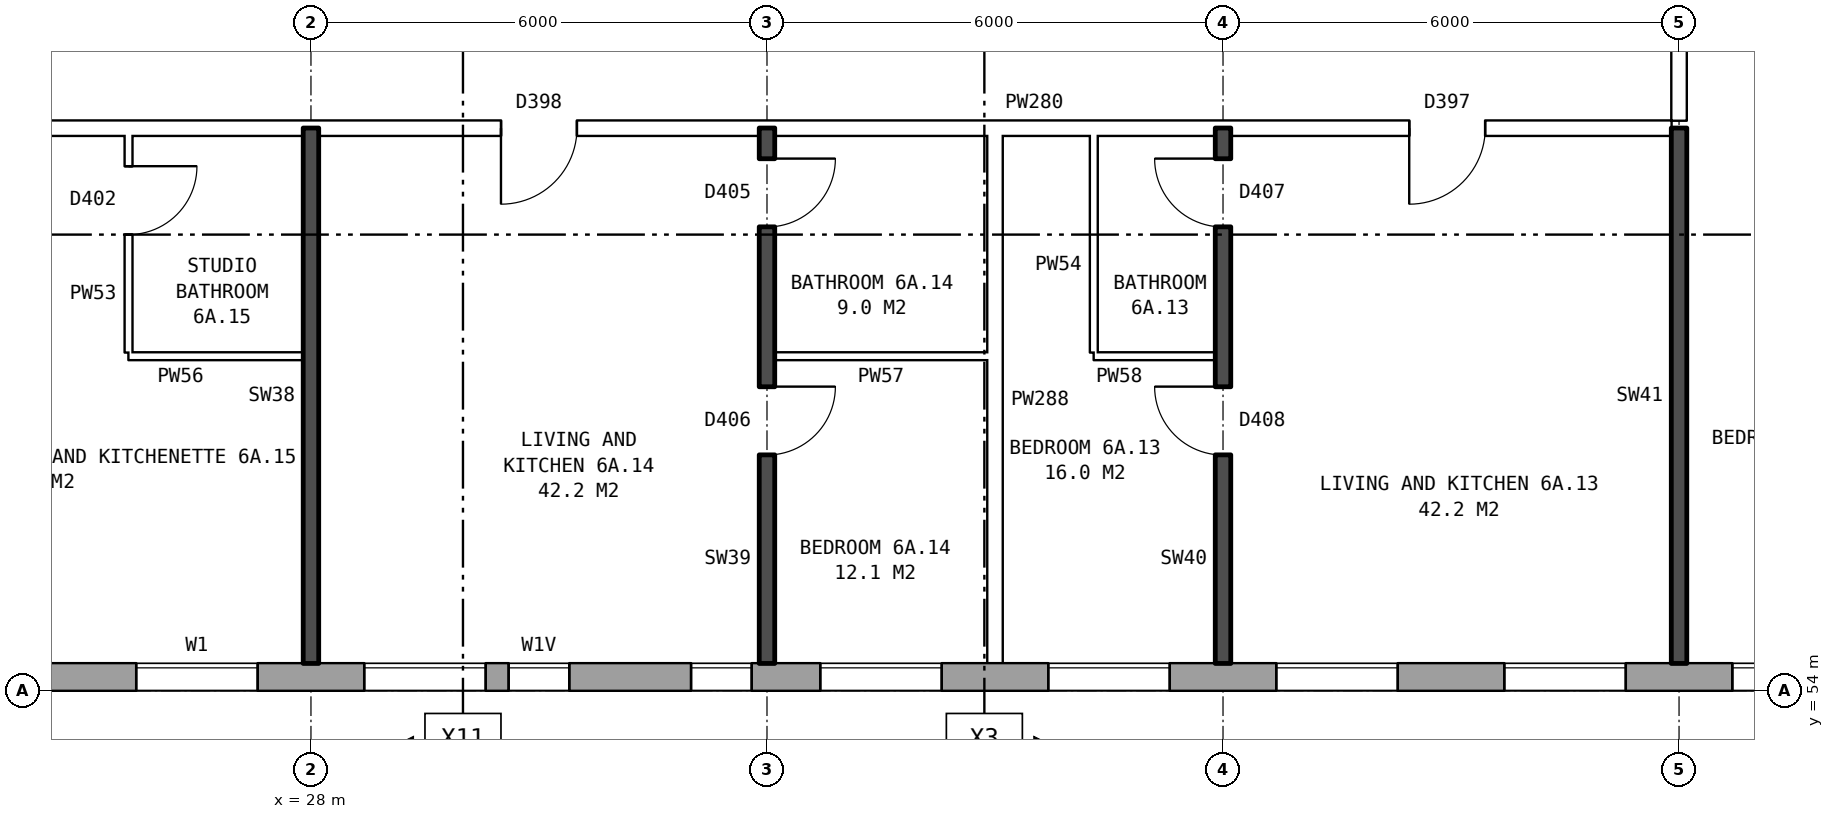
"""IFC4 building model, lengths in metres.
Left out: names, types, materials, properties, quantities, classifications, styles, units other than length and angle.
Written with IfcOpenShell. Run it as: python <this file> out.ifc"""

import sys

from ifc_helpers import new_model, si_unit, direction, frame, frame_2d, origin, place, context, subcontext, project, spatial, rectangle, extrude, element, fill, save


model = new_model("IFC4")
c1 = context("Model", 3, precision=1e-05, world=origin(), true_north=direction((0.0, 1.0)))
c2 = subcontext(c1, "Body", "Model", "MODEL_VIEW")
j1 = project(units=[si_unit("LENGTHUNIT", "METRE"), si_unit("PLANEANGLEUNIT", "RADIAN")], contexts=[c1])
p1 = place(None, origin())
s1 = spatial("IfcSite", under=j1, at=p1, CompositionType="ELEMENT")
p2 = place(p1, origin())
s2 = spatial("IfcBuilding", under=s1, at=p2, CompositionType="ELEMENT")
p3 = place(p2, frame((0.0, 0.0, 25.7)))
s3 = spatial("IfcBuildingStorey", under=s2, at=p3, CompositionType="ELEMENT", Elevation=25.7)
p4 = place(p3, frame((22.825, 54.18, 0.0), z_axis=(0.0, 0.0, 1.0), x_axis=(1.0, 0.0, 0.0)))
e1 = element("IfcWall", 1, at=p4, inside=s3, PredefinedType="STANDARD", context=c2, shape_type="SweptSolid", body=[
    extrude(rectangle(XDim=50.101, YDim=0.36, at=frame_2d((25.05, 0.0))), origin(), (0.0, 0.0, 1.0), 2.85),
])
p5 = place(p4, frame((2.875, 0.0, 0.8)))
e2 = element("IfcOpeningElement", 2, at=p5, cuts=e1, PredefinedType="OPENING", context=c2, shape_type="SweptSolid", body=[
    extrude(rectangle(XDim=1.6, YDim=1.8, at=frame_2d((0.8, 0.9))), frame((0.0, 0.19, 0.0), z_axis=(0.0, -1.0, 0.0), x_axis=(1.0, 0.0, 0.0)), (0.0, 0.0, 1.0), 0.38),
])
p6 = place(p4, frame((5.875, 0.0, 0.8)))
e3 = element("IfcOpeningElement", 3, at=p6, cuts=e1, PredefinedType="OPENING", context=c2, shape_type="SweptSolid", body=[
    extrude(rectangle(XDim=1.6, YDim=1.8, at=frame_2d((0.8, 0.9))), frame((0.0, 0.19, 0.0), z_axis=(0.0, -1.0, 0.0), x_axis=(1.0, 0.0, 0.0)), (0.0, 0.0, 1.0), 0.38),
])
p7 = place(p4, frame((7.775, 0.0, 1.6)))
e4 = element("IfcOpeningElement", 4, at=p7, cuts=e1, PredefinedType="OPENING", context=c2, shape_type="SweptSolid", body=[
    extrude(rectangle(XDim=0.8, YDim=0.9, at=frame_2d((0.4, 0.45))), frame((0.0, 0.19, 0.0), z_axis=(0.0, -1.0, 0.0), x_axis=(1.0, 0.0, 0.0)), (0.0, 0.0, 1.0), 0.38),
])
p8 = place(p4, frame((11.875, 0.0, 0.8)))
e5 = element("IfcOpeningElement", 5, at=p8, cuts=e1, PredefinedType="OPENING", context=c2, shape_type="SweptSolid", body=[
    extrude(rectangle(XDim=1.6, YDim=1.8, at=frame_2d((0.8, 0.9))), frame((0.0, 0.19, 0.0), z_axis=(0.0, -1.0, 0.0), x_axis=(1.0, 0.0, 0.0)), (0.0, 0.0, 1.0), 0.38),
])
p9 = place(p4, frame((14.875, 0.0, 0.8)))
e6 = element("IfcOpeningElement", 6, at=p9, cuts=e1, PredefinedType="OPENING", context=c2, shape_type="SweptSolid", body=[
    extrude(rectangle(XDim=1.6, YDim=1.8, at=frame_2d((0.8, 0.9))), frame((0.0, 0.19, 0.0), z_axis=(0.0, -1.0, 0.0), x_axis=(1.0, 0.0, 0.0)), (0.0, 0.0, 1.0), 0.38),
])
p10 = place(p4, frame((17.875, 0.0, 0.8)))
e7 = element("IfcOpeningElement", 7, at=p10, cuts=e1, PredefinedType="OPENING", context=c2, shape_type="SweptSolid", body=[
    extrude(rectangle(XDim=1.6, YDim=1.8, at=frame_2d((0.8, 0.9))), frame((0.0, 0.19, 0.0), z_axis=(0.0, -1.0, 0.0), x_axis=(1.0, 0.0, 0.0)), (0.0, 0.0, 1.0), 0.38),
])
p11 = place(p4, frame((20.875, 0.0, 0.8)))
e8 = element("IfcOpeningElement", 8, at=p11, cuts=e1, PredefinedType="OPENING", context=c2, shape_type="SweptSolid", body=[
    extrude(rectangle(XDim=1.6, YDim=1.8, at=frame_2d((0.8, 0.9))), frame((0.0, 0.19, 0.0), z_axis=(0.0, -1.0, 0.0), x_axis=(1.0, 0.0, 0.0)), (0.0, 0.0, 1.0), 0.38),
])
p12 = place(p4, frame((23.875, 0.0, 0.8)))
e9 = element("IfcOpeningElement", 9, at=p12, cuts=e1, PredefinedType="OPENING", context=c2, shape_type="SweptSolid", body=[
    extrude(rectangle(XDim=1.6, YDim=1.8, at=frame_2d((0.8, 0.9))), frame((0.0, 0.19, 0.0), z_axis=(0.0, -1.0, 0.0), x_axis=(1.0, 0.0, 0.0)), (0.0, 0.0, 1.0), 0.38),
])
p13 = place(p4, frame((26.875, 0.0, 0.8)))
e10 = element("IfcOpeningElement", 10, at=p13, cuts=e1, PredefinedType="OPENING", context=c2, shape_type="SweptSolid", body=[
    extrude(rectangle(XDim=1.6, YDim=1.8, at=frame_2d((0.8, 0.9))), frame((0.0, 0.19, 0.0), z_axis=(0.0, -1.0, 0.0), x_axis=(1.0, 0.0, 0.0)), (0.0, 0.0, 1.0), 0.38),
])
p14 = place(p4, frame((29.875, 0.0, 0.8)))
e11 = element("IfcOpeningElement", 11, at=p14, cuts=e1, PredefinedType="OPENING", context=c2, shape_type="SweptSolid", body=[
    extrude(rectangle(XDim=1.6, YDim=1.8, at=frame_2d((0.8, 0.9))), frame((0.0, 0.19, 0.0), z_axis=(0.0, -1.0, 0.0), x_axis=(1.0, 0.0, 0.0)), (0.0, 0.0, 1.0), 0.38),
])
p15 = place(p4, frame((32.875, 0.0, 0.8)))
e12 = element("IfcOpeningElement", 12, at=p15, cuts=e1, PredefinedType="OPENING", context=c2, shape_type="SweptSolid", body=[
    extrude(rectangle(XDim=1.6, YDim=1.8, at=frame_2d((0.8, 0.9))), frame((0.0, 0.19, 0.0), z_axis=(0.0, -1.0, 0.0), x_axis=(1.0, 0.0, 0.0)), (0.0, 0.0, 1.0), 0.38),
])
p16 = place(p4, frame((35.875, 0.0, 0.8)))
e13 = element("IfcOpeningElement", 13, at=p16, cuts=e1, PredefinedType="OPENING", context=c2, shape_type="SweptSolid", body=[
    extrude(rectangle(XDim=1.6, YDim=1.8, at=frame_2d((0.8, 0.9))), frame((0.0, 0.19, 0.0), z_axis=(0.0, -1.0, 0.0), x_axis=(1.0, 0.0, 0.0)), (0.0, 0.0, 1.0), 0.38),
])
p17 = place(p4, frame((38.325, 0.0, 0.15)))
e14 = element("IfcOpeningElement", 14, at=p17, cuts=e1, PredefinedType="OPENING", context=c2, shape_type="SweptSolid", body=[
    extrude(rectangle(XDim=1.2, YDim=1.8, at=frame_2d((0.6, 0.9))), frame((0.0, 0.19, 0.0), z_axis=(0.0, -1.0, 0.0), x_axis=(1.0, 0.0, 0.0)), (0.0, 0.0, 1.0), 0.38),
])
p18 = place(p4, frame((41.825, 0.0, 1.4)))
e15 = element("IfcOpeningElement", 15, at=p18, cuts=e1, PredefinedType="OPENING", context=c2, shape_type="SweptSolid", body=[
    extrude(rectangle(XDim=1.0, YDim=1.2, at=frame_2d((0.5, 0.6))), frame((0.0, 0.19, 0.0), z_axis=(0.0, -1.0, 0.0), x_axis=(1.0, 0.0, 0.0)), (0.0, 0.0, 1.0), 0.38),
])
p19 = place(p4, frame((44.875, 0.0, 0.8)))
e16 = element("IfcOpeningElement", 16, at=p19, cuts=e1, PredefinedType="OPENING", context=c2, shape_type="SweptSolid", body=[
    extrude(rectangle(XDim=1.6, YDim=1.8, at=frame_2d((0.8, 0.9))), frame((0.0, 0.19, 0.0), z_axis=(0.0, -1.0, 0.0), x_axis=(1.0, 0.0, 0.0)), (0.0, 0.0, 1.0), 0.38),
])
p20 = place(p4, frame((47.875, 0.0, 0.8)))
e17 = element("IfcOpeningElement", 17, at=p20, cuts=e1, PredefinedType="OPENING", context=c2, shape_type="SweptSolid", body=[
    extrude(rectangle(XDim=1.6, YDim=1.8, at=frame_2d((0.8, 0.9))), frame((0.0, 0.19, 0.0), z_axis=(0.0, -1.0, 0.0), x_axis=(1.0, 0.0, 0.0)), (0.0, 0.0, 1.0), 0.38),
])
p21 = place(p4, frame((10.175, 0.0, 0.8)))
e18 = element("IfcOpeningElement", 18, at=p21, cuts=e1, PredefinedType="OPENING", context=c2, shape_type="SweptSolid", body=[
    extrude(rectangle(XDim=0.8, YDim=0.9, at=frame_2d((0.4, 0.45))), frame((0.0, 0.19, 0.0), z_axis=(0.0, -1.0, 0.0), x_axis=(1.0, 0.0, 0.0)), (0.0, 0.0, 1.0), 0.38),
])
p22 = place(p4, frame((39.825, 0.0, 0.15)))
e19 = element("IfcOpeningElement", 19, at=p22, cuts=e1, PredefinedType="OPENING", context=c2, shape_type="SweptSolid", body=[
    extrude(rectangle(XDim=1.0, YDim=0.9, at=frame_2d((0.5, 0.45))), frame((0.0, 0.19, 0.0), z_axis=(0.0, -1.0, 0.0), x_axis=(1.0, 0.0, 0.0)), (0.0, 0.0, 1.0), 0.38),
])
p23 = place(p4, frame((43.125, 0.0, 0.8)))
e20 = element("IfcOpeningElement", 20, at=p23, cuts=e1, PredefinedType="OPENING", context=c2, shape_type="SweptSolid", body=[
    extrude(rectangle(XDim=1.4, YDim=1.8, at=frame_2d((0.7, 0.9))), frame((0.0, 0.19, 0.0), z_axis=(0.0, -1.0, 0.0), x_axis=(1.0, 0.0, 0.0)), (0.0, 0.0, 1.0), 0.38),
])
p24 = place(p3, frame((25.6, 58.4, 0.0), z_axis=(0.0, 0.0, 1.0), x_axis=(1.0, 0.0, 0.0)))
e21 = element("IfcWall", 21, at=p24, inside=s3, PredefinedType="PARTITIONING", context=c2, shape_type="SweptSolid", body=[
    extrude(rectangle(XDim=2.3, YDim=0.1, at=frame_2d((1.15, 0.0))), origin(), (0.0, 0.0, 1.0), 2.85),
])
p25 = place(p3, frame((34.1, 58.4, 0.0), z_axis=(0.0, 0.0, 1.0), x_axis=(1.0, 0.0, 0.0)))
e22 = element("IfcWall", 22, at=p25, inside=s3, PredefinedType="PARTITIONING", context=c2, shape_type="SweptSolid", body=[
    extrude(rectangle(XDim=2.8, YDim=0.1, at=frame_2d((1.4, 0.0))), origin(), (0.0, 0.0, 1.0), 2.85),
])
p26 = place(p3, frame((38.3, 58.4, 0.0), z_axis=(0.0, 0.0, 1.0), x_axis=(1.0, 0.0, 0.0)))
e23 = element("IfcWall", 23, at=p26, inside=s3, PredefinedType="PARTITIONING", context=c2, shape_type="SweptSolid", body=[
    extrude(rectangle(XDim=1.6, YDim=0.1, at=frame_2d((0.8, 0.0))), origin(), (0.0, 0.0, 1.0), 2.85),
])
p27 = place(p3, frame((20.11, 61.4, 0.0), z_axis=(0.0, 0.0, 1.0), x_axis=(1.0, 0.0, 0.0)))
e24 = element("IfcWall", 24, at=p27, inside=s3, PredefinedType="PARTITIONING", context=c2, shape_type="SweptSolid", body=[
    extrude(rectangle(XDim=25.79, YDim=0.2, at=frame_2d((12.895, 0.0))), origin(), (0.0, 0.0, 1.0), 2.85),
])
p28 = place(p27, frame((22.34, 0.0, 0.0)))
e25 = element("IfcOpeningElement", 25, at=p28, cuts=e24, PredefinedType="OPENING", context=c2, shape_type="SweptSolid", body=[
    extrude(rectangle(XDim=1.0, YDim=2.1, at=frame_2d((0.5, 1.05))), frame((0.0, 0.11, 0.0), z_axis=(0.0, -1.0, 0.0), x_axis=(1.0, 0.0, 0.0)), (0.0, 0.0, 1.0), 0.22),
])
p29 = place(p27, frame((10.39, 0.0, 0.0)))
e26 = element("IfcOpeningElement", 26, at=p29, cuts=e24, PredefinedType="OPENING", context=c2, shape_type="SweptSolid", body=[
    extrude(rectangle(XDim=1.0, YDim=2.1, at=frame_2d((0.5, 1.05))), frame((0.0, 0.11, 0.0), z_axis=(0.0, -1.0, 0.0), x_axis=(1.0, 0.0, 0.0)), (0.0, 0.0, 1.0), 0.22),
])
p30 = place(p27, frame((2.245, 0.0, 0.0)))
e27 = element("IfcOpeningElement", 27, at=p30, cuts=e24, PredefinedType="OPENING", context=c2, shape_type="SweptSolid", body=[
    extrude(rectangle(XDim=1.0, YDim=2.1, at=frame_2d((0.5, 1.05))), frame((0.0, 0.11, 0.0), z_axis=(0.0, -1.0, 0.0), x_axis=(1.0, 0.0, 0.0)), (0.0, 0.0, 1.0), 0.22),
])
p31 = place(p3, frame((25.6, 58.45, 0.0), z_axis=(0.0, 0.0, 1.0), x_axis=(0.0, 1.0, 0.0)))
e28 = element("IfcWall", 28, at=p31, inside=s3, PredefinedType="PARTITIONING", context=c2, shape_type="SweptSolid", body=[
    extrude(rectangle(XDim=2.85, YDim=0.1, at=frame_2d((1.425, 0.0))), origin(), (0.0, 0.0, 1.0), 2.85),
])
p32 = place(p31, frame((1.55, 0.0, 0.0)))
e29 = element("IfcOpeningElement", 29, at=p32, cuts=e28, PredefinedType="OPENING", context=c2, shape_type="SweptSolid", body=[
    extrude(rectangle(XDim=0.9, YDim=2.1, at=frame_2d((0.45, 1.05))), frame((0.0, 0.06, 0.0), z_axis=(0.0, -1.0, 0.0), x_axis=(1.0, 0.0, 0.0)), (0.0, 0.0, 1.0), 0.12),
])
p33 = place(p3, frame((28.0, 54.36, 0.0), z_axis=(0.0, 0.0, 1.0), x_axis=(0.0, 1.0, 0.0)))
e30 = element("IfcWall", 30, at=p33, inside=s3, PredefinedType="SOLIDWALL", context=c2, shape_type="SweptSolid", body=[
    extrude(rectangle(XDim=7.04, YDim=0.2, at=frame_2d((3.52, 0.0))), origin(), (0.0, 0.0, 1.0), 2.85),
])
p34 = place(p3, frame((34.0, 54.36, 0.0), z_axis=(0.0, 0.0, 1.0), x_axis=(0.0, 1.0, 0.0)))
e31 = element("IfcWall", 31, at=p34, inside=s3, PredefinedType="SOLIDWALL", context=c2, shape_type="SweptSolid", body=[
    extrude(rectangle(XDim=7.04, YDim=0.2, at=frame_2d((3.52, 0.0))), origin(), (0.0, 0.0, 1.0), 2.85),
])
p35 = place(p34, frame((2.74, 0.0, 0.0)))
e32 = element("IfcOpeningElement", 32, at=p35, cuts=e31, PredefinedType="OPENING", context=c2, shape_type="SweptSolid", body=[
    extrude(rectangle(XDim=0.9, YDim=2.1, at=frame_2d((0.45, 1.05))), frame((0.0, 0.11, 0.0), z_axis=(0.0, -1.0, 0.0), x_axis=(1.0, 0.0, 0.0)), (0.0, 0.0, 1.0), 0.22),
])
p36 = place(p34, frame((5.74, 0.0, 0.0)))
e33 = element("IfcOpeningElement", 33, at=p36, cuts=e31, PredefinedType="OPENING", context=c2, shape_type="SweptSolid", body=[
    extrude(rectangle(XDim=0.9, YDim=2.1, at=frame_2d((0.45, 1.05))), frame((0.0, 0.11, 0.0), z_axis=(0.0, -1.0, 0.0), x_axis=(1.0, 0.0, 0.0)), (0.0, 0.0, 1.0), 0.22),
])
p37 = place(p3, frame((37.0, 54.36, 0.0), z_axis=(0.0, 0.0, 1.0), x_axis=(0.0, 1.0, 0.0)))
e34 = element("IfcWall", 34, at=p37, inside=s3, PredefinedType="PARTITIONING", context=c2, shape_type="SweptSolid", body=[
    extrude(rectangle(XDim=6.94, YDim=0.2, at=frame_2d((3.47, 0.0))), origin(), (0.0, 0.0, 1.0), 2.85),
])
p38 = place(p3, frame((38.3, 58.45, 0.0), z_axis=(0.0, 0.0, 1.0), x_axis=(0.0, 1.0, 0.0)))
e35 = element("IfcWall", 35, at=p38, inside=s3, PredefinedType="PARTITIONING", context=c2, shape_type="SweptSolid", body=[
    extrude(rectangle(XDim=2.85, YDim=0.1, at=frame_2d((1.425, 0.0))), origin(), (0.0, 0.0, 1.0), 2.85),
])
p39 = place(p3, frame((40.0, 54.36, 0.0), z_axis=(0.0, 0.0, 1.0), x_axis=(0.0, 1.0, 0.0)))
e36 = element("IfcWall", 36, at=p39, inside=s3, PredefinedType="SOLIDWALL", context=c2, shape_type="SweptSolid", body=[
    extrude(rectangle(XDim=7.04, YDim=0.2, at=frame_2d((3.52, 0.0))), origin(), (0.0, 0.0, 1.0), 2.85),
])
p40 = place(p39, frame((2.74, 0.0, 0.0)))
e37 = element("IfcOpeningElement", 37, at=p40, cuts=e36, PredefinedType="OPENING", context=c2, shape_type="SweptSolid", body=[
    extrude(rectangle(XDim=0.9, YDim=2.1, at=frame_2d((0.45, 1.05))), frame((0.0, 0.11, 0.0), z_axis=(0.0, -1.0, 0.0), x_axis=(1.0, 0.0, 0.0)), (0.0, 0.0, 1.0), 0.22),
])
p41 = place(p39, frame((5.74, 0.0, 0.0)))
e38 = element("IfcOpeningElement", 38, at=p41, cuts=e36, PredefinedType="OPENING", context=c2, shape_type="SweptSolid", body=[
    extrude(rectangle(XDim=0.9, YDim=2.1, at=frame_2d((0.45, 1.05))), frame((0.0, 0.11, 0.0), z_axis=(0.0, -1.0, 0.0), x_axis=(1.0, 0.0, 0.0)), (0.0, 0.0, 1.0), 0.22),
])
p42 = place(p3, frame((46.0, 54.36, 0.0), z_axis=(0.0, 0.0, 1.0), x_axis=(0.0, 1.0, 0.0)))
e39 = element("IfcWall", 39, at=p42, inside=s3, PredefinedType="SOLIDWALL", context=c2, shape_type="SweptSolid", body=[
    extrude(rectangle(XDim=7.04, YDim=0.2, at=frame_2d((3.52, 0.0))), origin(), (0.0, 0.0, 1.0), 2.85),
])
p43 = place(p3, frame((46.0, 61.5, 0.0), z_axis=(0.0, 0.0, 1.0), x_axis=(0.0, 1.0, 0.0)))
e40 = element("IfcWall", 40, at=p43, inside=s3, PredefinedType="PARTITIONING", context=c2, shape_type="SweptSolid", body=[
    extrude(rectangle(XDim=2.2, YDim=0.2, at=frame_2d((1.1, 0.0))), origin(), (0.0, 0.0, 1.0), 2.85),
])
p44 = place(p5, origin())
e41 = element("IfcWindow", 41, at=p44, inside=s3, PartitioningType="SINGLE_PANEL", PredefinedType="WINDOW", context=c2, shape_type="SweptSolid", body=[
    extrude(rectangle(XDim=1.6, YDim=1.8, at=frame_2d((0.8, 0.9))), frame((0.0, 0.15, 0.0), z_axis=(0.0, -1.0, 0.0), x_axis=(1.0, 0.0, 0.0)), (0.0, 0.0, 1.0), 0.06),
])
fill(e2, e41)
p45 = place(p6, origin())
e42 = element("IfcWindow", 42, at=p45, inside=s3, PartitioningType="SINGLE_PANEL", PredefinedType="WINDOW", context=c2, shape_type="SweptSolid", body=[
    extrude(rectangle(XDim=1.6, YDim=1.8, at=frame_2d((0.8, 0.9))), frame((0.0, 0.15, 0.0), z_axis=(0.0, -1.0, 0.0), x_axis=(1.0, 0.0, 0.0)), (0.0, 0.0, 1.0), 0.06),
])
fill(e3, e42)
p46 = place(p7, origin())
e43 = element("IfcWindow", 43, at=p46, inside=s3, PartitioningType="SINGLE_PANEL", PredefinedType="WINDOW", context=c2, shape_type="SweptSolid", body=[
    extrude(rectangle(XDim=0.8, YDim=0.9, at=frame_2d((0.4, 0.45))), frame((0.0, 0.15, 0.0), z_axis=(0.0, -1.0, 0.0), x_axis=(1.0, 0.0, 0.0)), (0.0, 0.0, 1.0), 0.06),
])
fill(e4, e43)
p47 = place(p8, origin())
e44 = element("IfcWindow", 44, at=p47, inside=s3, PartitioningType="SINGLE_PANEL", PredefinedType="WINDOW", context=c2, shape_type="SweptSolid", body=[
    extrude(rectangle(XDim=1.6, YDim=1.8, at=frame_2d((0.8, 0.9))), frame((0.0, 0.15, 0.0), z_axis=(0.0, -1.0, 0.0), x_axis=(1.0, 0.0, 0.0)), (0.0, 0.0, 1.0), 0.06),
])
fill(e5, e44)
p48 = place(p9, origin())
e45 = element("IfcWindow", 45, at=p48, inside=s3, PartitioningType="SINGLE_PANEL", PredefinedType="WINDOW", context=c2, shape_type="SweptSolid", body=[
    extrude(rectangle(XDim=1.6, YDim=1.8, at=frame_2d((0.8, 0.9))), frame((0.0, 0.15, 0.0), z_axis=(0.0, -1.0, 0.0), x_axis=(1.0, 0.0, 0.0)), (0.0, 0.0, 1.0), 0.06),
])
fill(e6, e45)
p49 = place(p10, origin())
e46 = element("IfcWindow", 46, at=p49, inside=s3, PartitioningType="SINGLE_PANEL", PredefinedType="WINDOW", context=c2, shape_type="SweptSolid", body=[
    extrude(rectangle(XDim=1.6, YDim=1.8, at=frame_2d((0.8, 0.9))), frame((0.0, 0.15, 0.0), z_axis=(0.0, -1.0, 0.0), x_axis=(1.0, 0.0, 0.0)), (0.0, 0.0, 1.0), 0.06),
])
fill(e7, e46)
p50 = place(p11, origin())
e47 = element("IfcWindow", 47, at=p50, inside=s3, PartitioningType="SINGLE_PANEL", PredefinedType="WINDOW", context=c2, shape_type="SweptSolid", body=[
    extrude(rectangle(XDim=1.6, YDim=1.8, at=frame_2d((0.8, 0.9))), frame((0.0, 0.15, 0.0), z_axis=(0.0, -1.0, 0.0), x_axis=(1.0, 0.0, 0.0)), (0.0, 0.0, 1.0), 0.06),
])
fill(e8, e47)
p51 = place(p12, origin())
e48 = element("IfcWindow", 48, at=p51, inside=s3, PartitioningType="SINGLE_PANEL", PredefinedType="WINDOW", context=c2, shape_type="SweptSolid", body=[
    extrude(rectangle(XDim=1.6, YDim=1.8, at=frame_2d((0.8, 0.9))), frame((0.0, 0.15, 0.0), z_axis=(0.0, -1.0, 0.0), x_axis=(1.0, 0.0, 0.0)), (0.0, 0.0, 1.0), 0.06),
])
fill(e9, e48)
p52 = place(p40, origin())
e49 = element("IfcDoor", 49, at=p52, inside=s3, OperationType="SINGLE_SWING_RIGHT", PredefinedType="DOOR", context=c2, shape_type="SweptSolid", body=[
    extrude(rectangle(XDim=0.9, YDim=2.1, at=frame_2d((0.45, 1.05))), frame((0.0, 0.025, 0.0), z_axis=(0.0, -1.0, 0.0), x_axis=(1.0, 0.0, 0.0)), (0.0, 0.0, 1.0), 0.05),
])
fill(e37, e49)
p53 = place(p28, frame((1.0, 0.0, 0.0), z_axis=(0.0, 0.0, 1.0), x_axis=(-1.0, 0.0, 0.0)))
e50 = element("IfcDoor", 50, at=p53, inside=s3, OperationType="SINGLE_SWING_RIGHT", PredefinedType="DOOR", context=c2, shape_type="SweptSolid", body=[
    extrude(rectangle(XDim=1.0, YDim=2.1, at=frame_2d((0.5, 1.05))), frame((0.0, 0.025, 0.0), z_axis=(0.0, -1.0, 0.0), x_axis=(1.0, 0.0, 0.0)), (0.0, 0.0, 1.0), 0.05),
])
fill(e25, e50)
p54 = place(p41, origin())
e51 = element("IfcDoor", 51, at=p54, inside=s3, OperationType="SINGLE_SWING_RIGHT", PredefinedType="DOOR", context=c2, shape_type="SweptSolid", body=[
    extrude(rectangle(XDim=0.9, YDim=2.1, at=frame_2d((0.45, 1.05))), frame((0.0, 0.025, 0.0), z_axis=(0.0, -1.0, 0.0), x_axis=(1.0, 0.0, 0.0)), (0.0, 0.0, 1.0), 0.05),
])
fill(e38, e51)
p55 = place(p35, frame((0.9, 0.0, 0.0), z_axis=(0.0, 0.0, 1.0), x_axis=(-1.0, 0.0, 0.0)))
e52 = element("IfcDoor", 52, at=p55, inside=s3, OperationType="SINGLE_SWING_LEFT", PredefinedType="DOOR", context=c2, shape_type="SweptSolid", body=[
    extrude(rectangle(XDim=0.9, YDim=2.1, at=frame_2d((0.45, 1.05))), frame((0.0, 0.025, 0.0), z_axis=(0.0, -1.0, 0.0), x_axis=(1.0, 0.0, 0.0)), (0.0, 0.0, 1.0), 0.05),
])
fill(e32, e52)
p56 = place(p29, frame((1.0, 0.0, 0.0), z_axis=(0.0, 0.0, 1.0), x_axis=(-1.0, 0.0, 0.0)))
e53 = element("IfcDoor", 53, at=p56, inside=s3, OperationType="SINGLE_SWING_RIGHT", PredefinedType="DOOR", context=c2, shape_type="SweptSolid", body=[
    extrude(rectangle(XDim=1.0, YDim=2.1, at=frame_2d((0.5, 1.05))), frame((0.0, 0.025, 0.0), z_axis=(0.0, -1.0, 0.0), x_axis=(1.0, 0.0, 0.0)), (0.0, 0.0, 1.0), 0.05),
])
fill(e26, e53)
p57 = place(p36, frame((0.9, 0.0, 0.0), z_axis=(0.0, 0.0, 1.0), x_axis=(-1.0, 0.0, 0.0)))
e54 = element("IfcDoor", 54, at=p57, inside=s3, OperationType="SINGLE_SWING_LEFT", PredefinedType="DOOR", context=c2, shape_type="SweptSolid", body=[
    extrude(rectangle(XDim=0.9, YDim=2.1, at=frame_2d((0.45, 1.05))), frame((0.0, 0.025, 0.0), z_axis=(0.0, -1.0, 0.0), x_axis=(1.0, 0.0, 0.0)), (0.0, 0.0, 1.0), 0.05),
])
fill(e33, e54)
p58 = place(p32, frame((0.9, 0.0, 0.0), z_axis=(0.0, 0.0, 1.0), x_axis=(-1.0, 0.0, 0.0)))
e55 = element("IfcDoor", 55, at=p58, inside=s3, OperationType="SINGLE_SWING_LEFT", PredefinedType="DOOR", context=c2, shape_type="SweptSolid", body=[
    extrude(rectangle(XDim=0.9, YDim=2.1, at=frame_2d((0.45, 1.05))), frame((0.0, 0.025, 0.0), z_axis=(0.0, -1.0, 0.0), x_axis=(1.0, 0.0, 0.0)), (0.0, 0.0, 1.0), 0.05),
])
fill(e29, e55)
p59 = place(p21, origin())
e56 = element("IfcWindow", 56, at=p59, inside=s3, PartitioningType="SINGLE_PANEL", PredefinedType="WINDOW", context=c2, shape_type="SweptSolid", body=[
    extrude(rectangle(XDim=0.8, YDim=0.9, at=frame_2d((0.4, 0.45))), frame((0.0, 0.15, 0.0), z_axis=(0.0, -1.0, 0.0), x_axis=(1.0, 0.0, 0.0)), (0.0, 0.0, 1.0), 0.06),
])
fill(e18, e56)
save(model, sys.argv[1])
